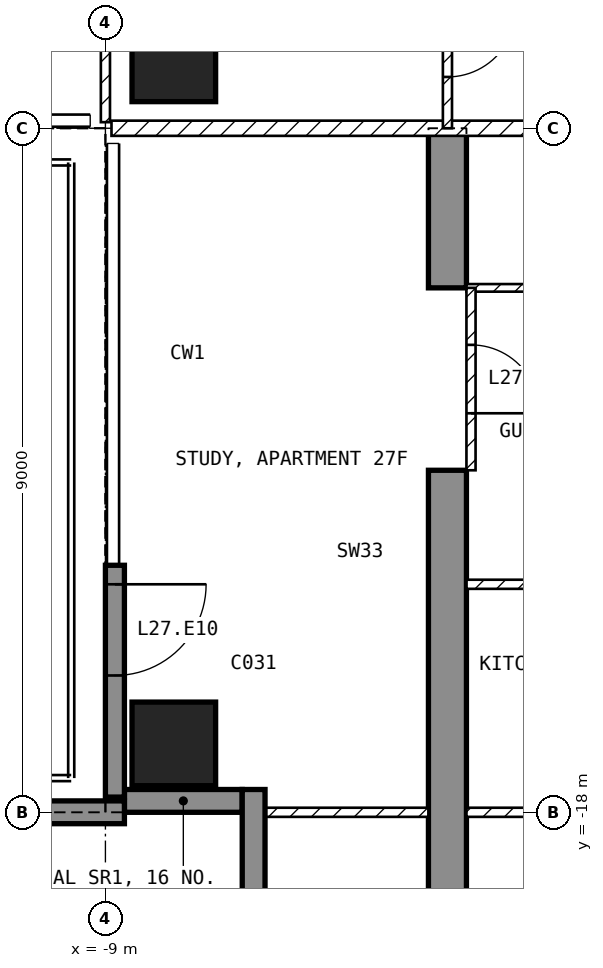
"""IFC4 building model, lengths in metres.
Left out: names, types, materials, properties, quantities, classifications, styles, units other than length and angle.
Written with IfcOpenShell. Run it as: python <this file> out.ifc"""

import sys

from ifc_helpers import new_model, si_unit, direction, frame, frame_2d, origin, origin_2d, place, context, subcontext, project, spatial, polyline, rectangle, outline, extrude, element, fill, save


model = new_model("IFC4")
c1 = context("Model", 3, precision=1e-05, world=origin(), true_north=direction((0.0, 1.0)))
c2 = subcontext(c1, "Body", "Model", "MODEL_VIEW")
j1 = project(units=[si_unit("LENGTHUNIT", "METRE"), si_unit("PLANEANGLEUNIT", "RADIAN")], contexts=[c1])
p1 = place(None, origin())
s1 = spatial("IfcSite", under=j1, at=p1, CompositionType="ELEMENT")
p2 = place(p1, origin())
s2 = spatial("IfcBuilding", under=s1, at=p2, CompositionType="ELEMENT")
p3 = place(p2, frame((0.0, 0.0, 116.4)))
s3 = spatial("IfcBuildingStorey", under=s2, at=p3, CompositionType="ELEMENT", Elevation=116.4)
for number, where, z_axis, x_axis in (
    (1, (-8.1, -17.1, -0.25), (0.0, 0.0, 1.0), (1.0, 0.0, 0.0)),
    (2, (-8.1, -8.1, -0.25), (0.0, 0.0, 1.0), (1.0, 0.0, 0.0)),
):
    element("IfcColumn", number, at=place(p3, frame(where, z_axis=z_axis, x_axis=x_axis)), inside=s3, PredefinedType="COLUMN", context=c2, shape_type="SweptSolid", body=[
        extrude(rectangle(XDim=1.1, YDim=1.1, at=origin_2d()), origin(), (0.0, 0.0, 1.0), 3.5),
    ])
p4 = place(p3, frame((-4.75, -20.15, -0.25), z_axis=(1.0, 0.0, 0.0), x_axis=(0.0, 1.0, 0.0)))
e3 = element("IfcWall", 3, at=p4, inside=s3, PredefinedType="SHEAR", context=c2, shape_type="SweptSolid", body=[
    extrude(outline(polyline([(0.0, 0.0), (6.65, 0.0), (6.65, 2.65), (9.05, 2.65), (9.05, 0.0), (11.15, 0.0), (11.15, 3.5), (0.0, 3.5), (0.0, 0.0)])), origin(), (0.0, 0.0, 1.0), 0.5),
])
p5 = place(p3, frame((-8.875, -14.75, 0.0), z_axis=(0.0, 0.0, 1.0), x_axis=(0.0, -1.0, 0.0)))
e4 = element("IfcWall", 4, at=p5, inside=s3, PredefinedType="SOLIDWALL", context=c2, shape_type="SweptSolid", body=[
    extrude(rectangle(XDim=3.05, YDim=0.25, at=frame_2d((1.525, 0.0))), origin(), (0.0, 0.0, 1.0), 3.25),
])
p6 = place(p5, frame((0.25, 0.0, 0.0)))
e5 = element("IfcOpeningElement", 5, at=p6, cuts=e4, PredefinedType="OPENING", context=c2, shape_type="SweptSolid", body=[
    extrude(rectangle(XDim=1.2, YDim=2.4, at=frame_2d((0.6, 1.2))), frame((0.0, 0.135, 0.0), z_axis=(0.0, -1.0, 0.0), x_axis=(1.0, 0.0, 0.0)), (0.0, 0.0, 1.0), 0.27),
])
p7 = place(p3, frame((-8.75, -17.85, 0.0), z_axis=(0.0, 0.0, 1.0), x_axis=(1.0, 0.0, 0.0)))
e6 = element("IfcWall", 6, at=p7, inside=s3, PredefinedType="SOLIDWALL", context=c2, shape_type="SweptSolid", body=[
    extrude(rectangle(XDim=1.55, YDim=0.3, at=frame_2d((0.775, 0.0))), origin(), (0.0, 0.0, 1.0), 3.25),
])
p8 = place(p3, frame((-7.05, -17.7, 0.0), z_axis=(0.0, 0.0, 1.0), x_axis=(0.0, -1.0, 0.0)))
e7 = element("IfcWall", 7, at=p8, inside=s3, PredefinedType="SOLIDWALL", context=c2, shape_type="SweptSolid", body=[
    extrude(rectangle(XDim=1.8, YDim=0.3, at=frame_2d((0.9, 0.0))), origin(), (0.0, 0.0, 1.0), 3.25),
])
p9 = place(p3, frame((-8.75, -18.0, 0.0), z_axis=(0.0, 0.0, 1.0), x_axis=(-1.0, 0.0, 0.0)))
e8 = element("IfcWall", 8, at=p9, inside=s3, PredefinedType="SOLIDWALL", context=c2, shape_type="SweptSolid", body=[
    extrude(rectangle(XDim=2.99, YDim=0.3, at=frame_2d((1.495, 0.0))), origin(), (0.0, 0.0, 1.0), 3.25),
])
p10 = place(p3, frame((8.92, -9.0, 0.0), z_axis=(0.0, 0.0, 1.0), x_axis=(-1.0, 0.0, 0.0)))
e9 = element("IfcWall", 9, at=p10, inside=s3, PredefinedType="PARTITIONING", context=c2, shape_type="SweptSolid", body=[
    extrude(rectangle(XDim=17.84, YDim=0.2, at=frame_2d((8.92, 0.0))), origin(), (0.0, 0.0, 1.0), 3.25),
])
p11 = place(p10, frame((8.42, 0.0, 0.0)))
e10 = element("IfcOpeningElement", 10, at=p11, cuts=e9, PredefinedType="OPENING", context=c2, shape_type="SweptSolid", body=[
    extrude(rectangle(XDim=1.0, YDim=2.1, at=frame_2d((0.5, 1.05))), frame((0.0, 0.11, 0.0), z_axis=(0.0, -1.0, 0.0), x_axis=(1.0, 0.0, 0.0)), (0.0, 0.0, 1.0), 0.22),
])
p12 = place(p3, frame((-9.0, -1.3, 0.0), z_axis=(0.0, 0.0, 1.0), x_axis=(0.0, -1.0, 0.0)))
e11 = element("IfcWall", 11, at=p12, inside=s3, PredefinedType="PARTITIONING", context=c2, shape_type="SweptSolid", body=[
    extrude(rectangle(XDim=7.62, YDim=0.12, at=frame_2d((3.81, 0.0))), origin(), (0.0, 0.0, 1.0), 3.25),
])
p13 = place(p12, frame((4.77, 0.0, 0.0)))
e12 = element("IfcOpeningElement", 12, at=p13, cuts=e11, PredefinedType="OPENING", context=c2, shape_type="SweptSolid", body=[
    extrude(rectangle(XDim=0.9, YDim=2.1, at=frame_2d((0.45, 1.05))), frame((0.0, 0.07, 0.0), z_axis=(0.0, -1.0, 0.0), x_axis=(1.0, 0.0, 0.0)), (0.0, 0.0, 1.0), 0.14),
])
p14 = place(p3, frame((-4.5, -6.75, 0.0), z_axis=(0.0, 0.0, 1.0), x_axis=(0.0, -1.0, 0.0)))
e13 = element("IfcWall", 13, at=p14, inside=s3, PredefinedType="PARTITIONING", context=c2, shape_type="SweptSolid", body=[
    extrude(rectangle(XDim=2.25, YDim=0.12, at=frame_2d((1.125, 0.0))), origin(), (0.0, 0.0, 1.0), 3.25),
])
p15 = place(p14, frame((0.675, 0.0, 0.0)))
e14 = element("IfcOpeningElement", 14, at=p15, cuts=e13, PredefinedType="OPENING", context=c2, shape_type="SweptSolid", body=[
    extrude(rectangle(XDim=0.9, YDim=2.1, at=frame_2d((0.45, 1.05))), frame((0.0, 0.07, 0.0), z_axis=(0.0, -1.0, 0.0), x_axis=(1.0, 0.0, 0.0)), (0.0, 0.0, 1.0), 0.14),
])
p16 = place(p3, frame((-2.1, -11.1, 0.0), z_axis=(0.0, 0.0, 1.0), x_axis=(-1.0, 0.0, 0.0)))
e15 = element("IfcWall", 15, at=p16, inside=s3, PredefinedType="PARTITIONING", context=c2, shape_type="SweptSolid", body=[
    extrude(rectangle(XDim=2.15, YDim=0.1, at=frame_2d((1.075, 0.0))), origin(), (0.0, 0.0, 1.0), 3.25),
])
p17 = place(p3, frame((-0.44, -15.0, 0.0), z_axis=(0.0, 0.0, 1.0), x_axis=(-1.0, 0.0, 0.0)))
e16 = element("IfcWall", 16, at=p17, inside=s3, PredefinedType="PARTITIONING", context=c2, shape_type="SweptSolid", body=[
    extrude(rectangle(XDim=3.81, YDim=0.12, at=frame_2d((1.905, 0.0))), origin(), (0.0, 0.0, 1.0), 3.25),
])
p18 = place(p3, frame((4.25, -18.0, 0.0), z_axis=(0.0, 0.0, 1.0), x_axis=(-1.0, 0.0, 0.0)))
e17 = element("IfcWall", 17, at=p18, inside=s3, PredefinedType="PARTITIONING", context=c2, shape_type="SweptSolid", body=[
    extrude(rectangle(XDim=8.5, YDim=0.12, at=frame_2d((4.25, 0.0))), origin(), (0.0, 0.0, 1.0), 3.25),
])
p19 = place(p18, frame((1.925, 0.0, 0.0)))
e18 = element("IfcOpeningElement", 18, at=p19, cuts=e17, PredefinedType="OPENING", context=c2, shape_type="SweptSolid", body=[
    extrude(rectangle(XDim=0.9, YDim=2.1, at=frame_2d((0.45, 1.05))), frame((0.0, 0.07, 0.0), z_axis=(0.0, -1.0, 0.0), x_axis=(1.0, 0.0, 0.0)), (0.0, 0.0, 1.0), 0.14),
])
p20 = place(p3, frame((-4.75, -18.0, 0.0), z_axis=(0.0, 0.0, 1.0), x_axis=(-1.0, 0.0, 0.0)))
e19 = element("IfcWall", 19, at=p20, inside=s3, PredefinedType="PARTITIONING", context=c2, shape_type="SweptSolid", body=[
    extrude(rectangle(XDim=2.37, YDim=0.12, at=frame_2d((1.185, 0.0))), origin(), (0.0, 0.0, 1.0), 3.25),
])
p21 = place(p3, frame((-4.19, -11.1, 0.0), z_axis=(0.0, 0.0, 1.0), x_axis=(0.0, -1.0, 0.0)))
e20 = element("IfcWall", 20, at=p21, inside=s3, PredefinedType="PARTITIONING", context=c2, shape_type="SweptSolid", body=[
    extrude(rectangle(XDim=2.4, YDim=0.12, at=frame_2d((1.2, 0.0))), origin(), (0.0, 0.0, 1.0), 2.4),
])
p22 = place(p21, frame((0.75, 0.0, 0.0)))
e21 = element("IfcOpeningElement", 21, at=p22, cuts=e20, PredefinedType="OPENING", context=c2, shape_type="SweptSolid", body=[
    extrude(rectangle(XDim=0.9, YDim=2.1, at=frame_2d((0.45, 1.05))), frame((0.0, 0.07, 0.0), z_axis=(0.0, -1.0, 0.0), x_axis=(1.0, 0.0, 0.0)), (0.0, 0.0, 1.0), 0.14),
])
p23 = place(p6, origin())
e22 = element("IfcDoor", 22, at=p23, inside=s3, OperationType="SINGLE_SWING_LEFT", PredefinedType="DOOR", context=c2, shape_type="SweptSolid", body=[
    extrude(rectangle(XDim=1.2, YDim=2.4, at=frame_2d((0.6, 1.2))), frame((0.0, 0.025, 0.0), z_axis=(0.0, -1.0, 0.0), x_axis=(1.0, 0.0, 0.0)), (0.0, 0.0, 1.0), 0.05),
])
fill(e5, e22)
p24 = place(p15, origin())
e23 = element("IfcDoor", 23, at=p24, inside=s3, OperationType="SINGLE_SWING_LEFT", PredefinedType="DOOR", context=c2, shape_type="SweptSolid", body=[
    extrude(rectangle(XDim=0.9, YDim=2.1, at=frame_2d((0.45, 1.05))), frame((0.0, 0.025, 0.0), z_axis=(0.0, -1.0, 0.0), x_axis=(1.0, 0.0, 0.0)), (0.0, 0.0, 1.0), 0.05),
])
fill(e14, e23)
p25 = place(p22, origin())
e24 = element("IfcDoor", 24, at=p25, inside=s3, OperationType="SINGLE_SWING_RIGHT", PredefinedType="DOOR", context=c2, shape_type="SweptSolid", body=[
    extrude(rectangle(XDim=0.9, YDim=2.1, at=frame_2d((0.45, 1.05))), frame((0.0, 0.025, 0.0), z_axis=(0.0, -1.0, 0.0), x_axis=(1.0, 0.0, 0.0)), (0.0, 0.0, 1.0), 0.05),
])
fill(e21, e24)
save(model, sys.argv[1])
